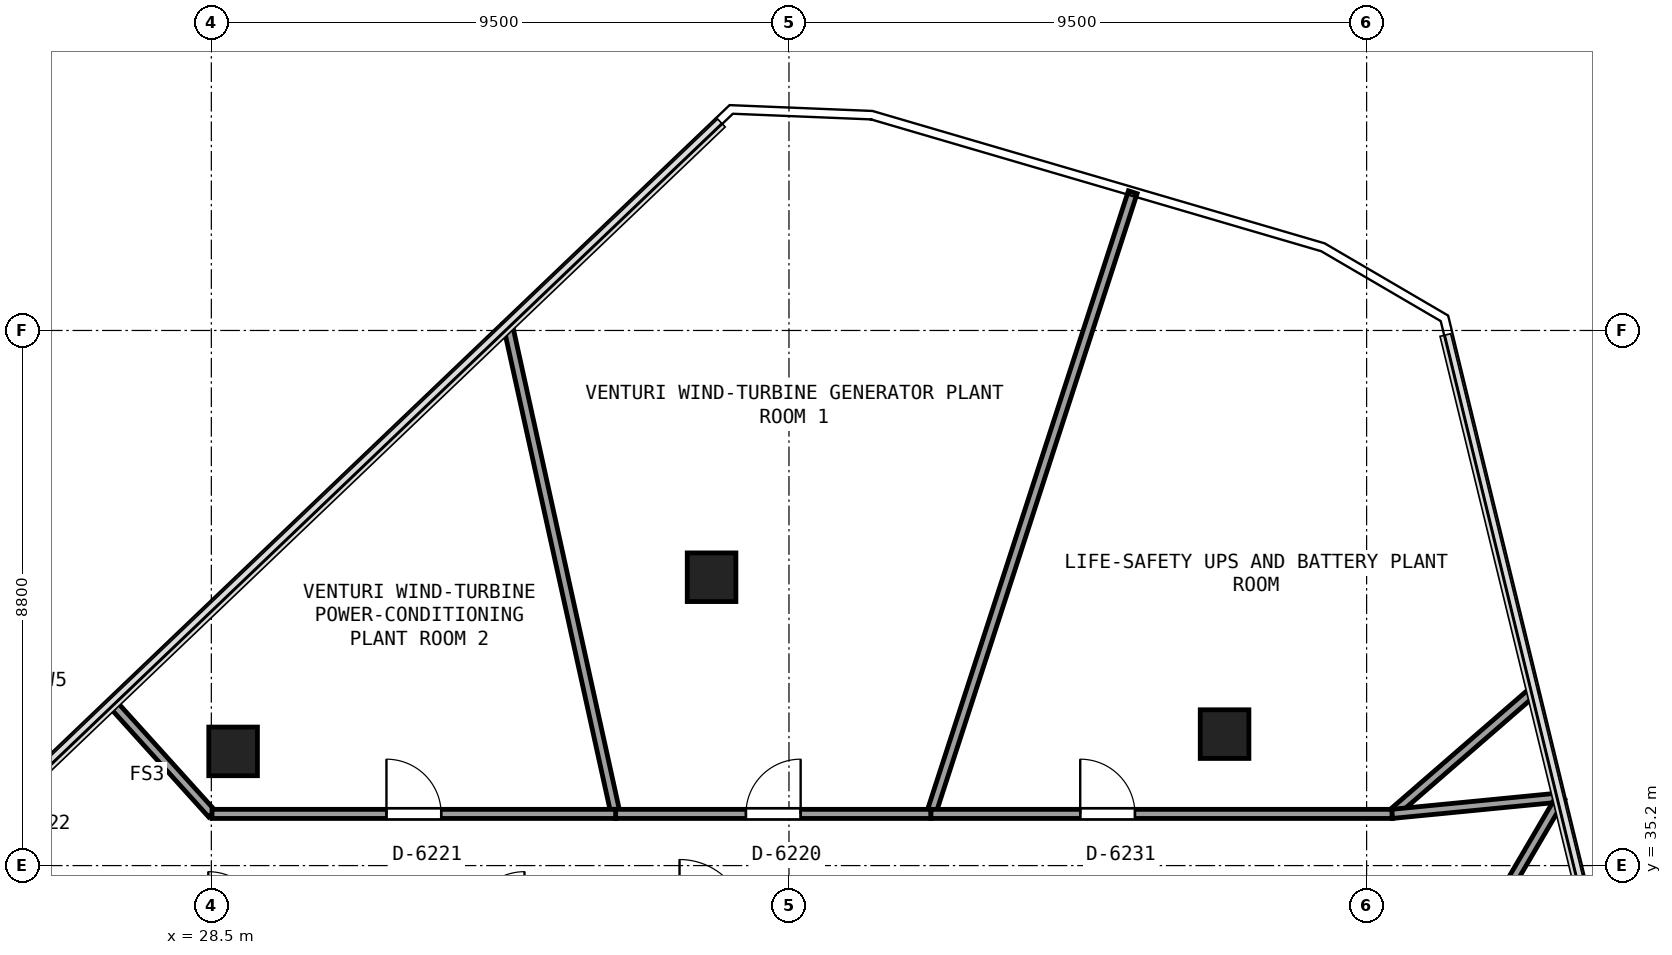
"""IFC4 building model, lengths in metres.
Left out: names, types, materials, properties, quantities, classifications, styles, units other than length and angle.
Written with IfcOpenShell. Run it as: python <this file> out.ifc"""

import sys

from ifc_helpers import new_model, si_unit, direction, frame, frame_2d, origin, origin_2d, place, context, subcontext, project, spatial, rectangle, extrude, element, fill, save


model = new_model("IFC4")
c1 = context("Model", 3, precision=1e-05, world=origin(), true_north=direction((0.0, 1.0)))
c2 = subcontext(c1, "Body", "Model", "MODEL_VIEW")
j1 = project(units=[si_unit("LENGTHUNIT", "METRE"), si_unit("PLANEANGLEUNIT", "RADIAN")], contexts=[c1])
p1 = place(None, origin())
s1 = spatial("IfcSite", under=j1, at=p1, CompositionType="ELEMENT")
p2 = place(p1, origin())
s2 = spatial("IfcBuilding", under=s1, at=p2, CompositionType="ELEMENT")
p3 = place(p2, frame((0.0, 0.0, 231.9)))
s3 = spatial("IfcBuildingStorey", under=s2, at=p3, CompositionType="ELEMENT", Elevation=231.9)
for number, where, z_axis, x_axis in (
    (1, (45.164, 37.362, 0.0), (0.0, 0.0, 1.0), (1.0, 0.0, 0.0)),
    (2, (36.727, 39.942, 0.0), (0.0, 0.0, 1.0), (1.0, 0.0, 0.0)),
    (3, (28.858, 37.078, 0.0), (0.0, 0.0, 1.0), (1.0, 0.0, 0.0)),
):
    element("IfcColumn", number, at=place(p3, frame(where, z_axis=z_axis, x_axis=x_axis)), inside=s3, PredefinedType="COLUMN", context=c2, shape_type="SweptSolid", body=[
        extrude(rectangle(XDim=0.8, YDim=0.8, at=origin_2d()), origin(), (0.0, 0.0, 1.0), 3.18),
    ])
p4 = place(p3, frame((40.335, 36.05, 0.0), z_axis=(0.0, 0.0, 1.0), x_axis=(0.308777401337, 0.951134331429, 0.0)))
e4 = element("IfcWall", 4, at=p4, inside=s3, PredefinedType="PARTITIONING", context=c2, shape_type="SweptSolid", body=[
    extrude(rectangle(XDim=10.749, YDim=0.15, at=frame_2d((5.375, 0.0))), origin(), (0.0, 0.0, 1.0), 2.701),
])
p5 = place(p3, frame((33.369, 44.122, 0.0), z_axis=(0.0, 0.0, 1.0), x_axis=(0.215344626995, -0.976538115807, 0.0)))
e5 = element("IfcWall", 5, at=p5, inside=s3, PredefinedType="PARTITIONING", context=c2, shape_type="SweptSolid", body=[
    extrude(rectangle(XDim=8.266, YDim=0.15, at=frame_2d((4.133, 0.0))), origin(), (0.0, 0.0, 1.0), 2.705),
])
p6 = place(p3, frame((35.149, 36.05, 0.0), z_axis=(0.0, 0.0, 1.0), x_axis=(1.0, 0.0, 0.0)))
e6 = element("IfcWall", 6, at=p6, inside=s3, PredefinedType="PARTITIONING", context=c2, shape_type="SweptSolid", body=[
    extrude(rectangle(XDim=5.186, YDim=0.15, at=frame_2d((2.593, 0.0))), origin(), (0.0, 0.0, 1.0), 2.625),
])
p7 = place(p6, frame((2.143, 0.0, 0.0)))
e7 = element("IfcOpeningElement", 7, at=p7, cuts=e6, PredefinedType="OPENING", context=c2, shape_type="SweptSolid", body=[
    extrude(rectangle(XDim=0.9, YDim=2.0, at=frame_2d((0.45, 1.0))), frame((0.0, 0.085, 0.0), z_axis=(0.0, -1.0, 0.0), x_axis=(1.0, 0.0, 0.0)), (0.0, 0.0, 1.0), 0.17),
])
p8 = place(p3, frame((26.854, 37.885, 0.0), z_axis=(0.0, 0.0, 1.0), x_axis=(0.670196786498, -0.7421834459, 0.0)))
e8 = element("IfcWall", 8, at=p8, inside=s3, PredefinedType="PARTITIONING", context=c2, shape_type="SweptSolid", body=[
    extrude(rectangle(XDim=2.472, YDim=0.15, at=frame_2d((1.236, 0.0))), origin(), (0.0, 0.0, 1.0), 2.705),
])
p9 = place(p3, frame((28.511, 36.05, 0.0), z_axis=(0.0, 0.0, 1.0), x_axis=(1.0, 0.0, 0.0)))
e9 = element("IfcWall", 9, at=p9, inside=s3, PredefinedType="PARTITIONING", context=c2, shape_type="SweptSolid", body=[
    extrude(rectangle(XDim=6.638, YDim=0.15, at=frame_2d((3.319, 0.0))), origin(), (0.0, 0.0, 1.0), 2.625),
])
p10 = place(p9, frame((2.869, 0.0, 0.0)))
e10 = element("IfcOpeningElement", 10, at=p10, cuts=e9, PredefinedType="OPENING", context=c2, shape_type="SweptSolid", body=[
    extrude(rectangle(XDim=0.9, YDim=2.0, at=frame_2d((0.45, 1.0))), frame((0.0, 0.085, 0.0), z_axis=(0.0, -1.0, 0.0), x_axis=(1.0, 0.0, 0.0)), (0.0, 0.0, 1.0), 0.17),
])
p11 = place(p3, frame((50.267, 38.089, 0.0), z_axis=(0.0, 0.0, 1.0), x_axis=(-0.75532132491, -0.655354633871, 0.0)))
e11 = element("IfcWall", 11, at=p11, inside=s3, PredefinedType="PARTITIONING", context=c2, shape_type="SweptSolid", body=[
    extrude(rectangle(XDim=3.111, YDim=0.15, at=frame_2d((1.556, 0.0))), origin(), (0.0, 0.0, 1.0), 3.18),
])
p12 = place(p3, frame((47.917, 36.05, 0.0), z_axis=(0.0, 0.0, 1.0), x_axis=(0.995272571321, 0.097121103663, 0.0)))
e12 = element("IfcWall", 12, at=p12, inside=s3, PredefinedType="PARTITIONING", context=c2, shape_type="SweptSolid", body=[
    extrude(rectangle(XDim=2.79, YDim=0.15, at=frame_2d((1.395, 0.0))), origin(), (0.0, 0.0, 1.0), 3.18),
])
p13 = place(p3, frame((50.694, 36.321, 0.0), z_axis=(0.0, 0.0, 1.0), x_axis=(-0.505943702969, -0.862566501451, 0.0)))
e13 = element("IfcWall", 13, at=p13, inside=s3, PredefinedType="PARTITIONING", context=c2, shape_type="SweptSolid", body=[
    extrude(rectangle(XDim=2.459, YDim=0.15, at=frame_2d((1.229, 0.0))), origin(), (0.0, 0.0, 1.0), 3.18),
])
p14 = place(p3, frame((40.335, 36.05, 0.0), z_axis=(0.0, 0.0, 1.0), x_axis=(1.0, 0.0, 0.0)))
e14 = element("IfcWall", 14, at=p14, inside=s3, PredefinedType="PARTITIONING", context=c2, shape_type="SweptSolid", body=[
    extrude(rectangle(XDim=7.582, YDim=0.15, at=frame_2d((3.791, 0.0))), origin(), (0.0, 0.0, 1.0), 2.625),
])
p15 = place(p14, frame((2.455, 0.0, 0.0)))
e15 = element("IfcOpeningElement", 15, at=p15, cuts=e14, PredefinedType="OPENING", context=c2, shape_type="SweptSolid", body=[
    extrude(rectangle(XDim=0.9, YDim=2.0, at=frame_2d((0.45, 1.0))), frame((0.0, 0.085, 0.0), z_axis=(0.0, -1.0, 0.0), x_axis=(1.0, 0.0, 0.0)), (0.0, 0.0, 1.0), 0.17),
])
p16 = place(p7, origin())
e16 = element("IfcDoor", 16, at=p16, inside=s3, OperationType="SINGLE_SWING_RIGHT", PredefinedType="DOOR", context=c2, shape_type="SweptSolid", body=[
    extrude(rectangle(XDim=0.9, YDim=2.0, at=frame_2d((0.45, 1.0))), frame((0.0, 0.025, 0.0), z_axis=(0.0, -1.0, 0.0), x_axis=(1.0, 0.0, 0.0)), (0.0, 0.0, 1.0), 0.05),
])
fill(e7, e16)
p17 = place(p10, origin())
e17 = element("IfcDoor", 17, at=p17, inside=s3, OperationType="SINGLE_SWING_LEFT", PredefinedType="DOOR", context=c2, shape_type="SweptSolid", body=[
    extrude(rectangle(XDim=0.9, YDim=2.0, at=frame_2d((0.45, 1.0))), frame((0.0, 0.025, 0.0), z_axis=(0.0, -1.0, 0.0), x_axis=(1.0, 0.0, 0.0)), (0.0, 0.0, 1.0), 0.05),
])
fill(e10, e17)
p18 = place(p15, origin())
e18 = element("IfcDoor", 18, at=p18, inside=s3, OperationType="SINGLE_SWING_LEFT", PredefinedType="DOOR", context=c2, shape_type="SweptSolid", body=[
    extrude(rectangle(XDim=0.9, YDim=2.0, at=frame_2d((0.45, 1.0))), frame((0.0, 0.025, 0.0), z_axis=(0.0, -1.0, 0.0), x_axis=(1.0, 0.0, 0.0)), (0.0, 0.0, 1.0), 0.05),
])
fill(e15, e18)
save(model, sys.argv[1])
